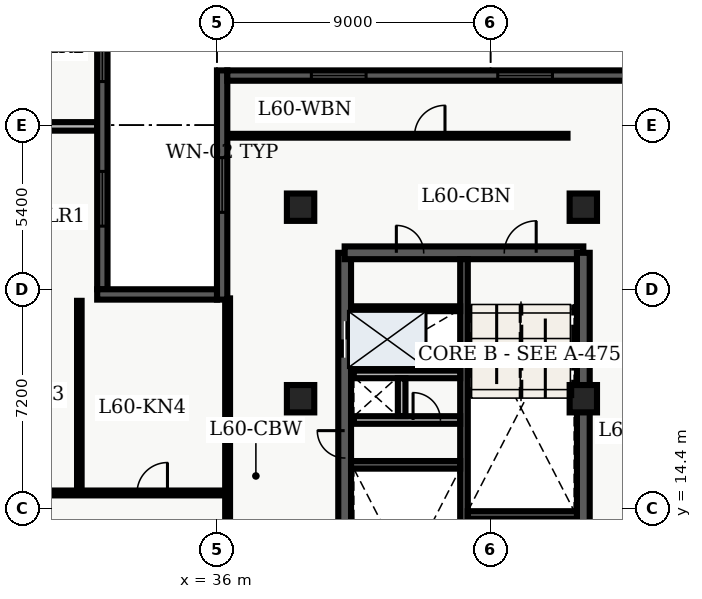
"""IFC4 building model, lengths in metres.
Left out: names, types, materials, properties, quantities, classifications, styles, units other than length and angle.
Written with IfcOpenShell. Run it as: python <this file> out.ifc"""

import sys

from ifc_helpers import new_model, entity, si_unit, converted_unit, direction, frame, origin_with_axes, origin_2d_with_axis, place, context, subcontext, project, spatial, polyline, rectangle, outline, extrude, element, fill, save


model = new_model("IFC4")
c1 = context("Model", 3, precision=1e-05, world=origin_with_axes(), true_north=direction((0.0, 1.0)))
c2 = subcontext(c1, "Body", "Model", "MODEL_VIEW")
j1 = project(units=[si_unit("LENGTHUNIT", "METRE"), converted_unit("PLANEANGLEUNIT", "DEGREE", entity("IfcPlaneAngleMeasure", 0.017), si_unit("PLANEANGLEUNIT", "RADIAN"), dimensions=[0, 0, 0, 0, 0, 0, 0])], contexts=[c1])
p1 = place(None, origin_with_axes())
s1 = spatial("IfcSite", under=j1, at=p1, CompositionType="ELEMENT")
p2 = place(p1, origin_with_axes())
s2 = spatial("IfcBuilding", under=s1, at=p2, CompositionType="ELEMENT")
p3 = place(p2, frame((0.0, 0.0, 244.2), z_axis=(0.0, 0.0, 1.0), x_axis=(1.0, 0.0, 0.0)))
s3 = spatial("IfcBuildingStorey", under=s2, at=p3, CompositionType="ELEMENT", Elevation=244.2)
p4 = place(p3, frame((40.2, 7.2, 0.0), z_axis=(0.0, 0.0, 1.0), x_axis=(0.0, 1.0, 0.0)))
e1 = element("IfcWall", 1, at=p4, inside=s3, PredefinedType="SHEAR", context=c2, shape_type="SweptSolid", body=[
    extrude(outline(polyline([(0.0, -0.21), (15.6, -0.21), (15.6, 0.21), (0.0, 0.21), (0.0, -0.21)])), origin_with_axes(), (0.0, 0.0, 1.0), 3.6),
])
p5 = place(p4, frame((12.75, 0.0, 0.0), z_axis=(0.0, 0.0, 1.0), x_axis=(1.0, 0.0, 0.0)))
e2 = element("IfcOpeningElement", 2, at=p5, cuts=e1, PredefinedType="OPENING", context=c2, shape_type="SweptSolid", body=[
    extrude(rectangle(XDim=1.2, YDim=0.44, at=origin_2d_with_axis()), origin_with_axes(), (0.0, 0.0, 1.0), 2.15),
])
p6 = place(p4, frame((9.3, 0.0, 0.0), z_axis=(0.0, 0.0, 1.0), x_axis=(1.0, 0.0, 0.0)))
e3 = element("IfcOpeningElement", 3, at=p6, cuts=e1, PredefinedType="OPENING", context=c2, shape_type="SweptSolid", body=[
    extrude(rectangle(XDim=0.9, YDim=0.44, at=origin_2d_with_axis()), origin_with_axes(), (0.0, 0.0, 1.0), 2.15),
])
p7 = place(p3, frame((40.2, 22.8, 0.0), z_axis=(0.0, 0.0, 1.0), x_axis=(1.0, 0.0, 0.0)))
e4 = element("IfcWall", 4, at=p7, inside=s3, PredefinedType="SHEAR", context=c2, shape_type="SweptSolid", body=[
    extrude(outline(polyline([(0.0, -0.21), (7.85, -0.21), (7.85, 0.21), (0.0, 0.21), (0.0, -0.21)])), origin_with_axes(), (0.0, 0.0, 1.0), 3.6),
])
p8 = place(p7, frame((5.775, 0.0, 0.0), z_axis=(0.0, 0.0, 1.0), x_axis=(1.0, 0.0, 0.0)))
e5 = element("IfcOpeningElement", 5, at=p8, cuts=e4, PredefinedType="OPENING", context=c2, shape_type="SweptSolid", body=[
    extrude(rectangle(XDim=1.05, YDim=0.44, at=origin_2d_with_axis()), origin_with_axes(), (0.0, 0.0, 1.0), 2.15),
])
p9 = place(p7, frame((2.15, 0.0, 0.0), z_axis=(0.0, 0.0, 1.0), x_axis=(1.0, 0.0, 0.0)))
e6 = element("IfcOpeningElement", 6, at=p9, cuts=e4, PredefinedType="OPENING", context=c2, shape_type="SweptSolid", body=[
    extrude(rectangle(XDim=0.9, YDim=0.44, at=origin_2d_with_axis()), origin_with_axes(), (0.0, 0.0, 1.0), 2.15),
])
p10 = place(p3, frame((48.05, 7.2, 0.0), z_axis=(0.0, 0.0, 1.0), x_axis=(0.0, 1.0, 0.0)))
e7 = element("IfcWall", 7, at=p10, inside=s3, PredefinedType="SHEAR", context=c2, shape_type="SweptSolid", body=[
    extrude(outline(polyline([(0.0, -0.21), (15.6, -0.21), (15.6, 0.21), (0.0, 0.21), (0.0, -0.21)])), origin_with_axes(), (0.0, 0.0, 1.0), 3.6),
])
p11 = place(p10, frame((1.375, 0.0, 0.0), z_axis=(0.0, 0.0, 1.0), x_axis=(1.0, 0.0, 0.0)))
e8 = element("IfcOpeningElement", 8, at=p11, cuts=e7, PredefinedType="OPENING", context=c2, shape_type="SweptSolid", body=[
    extrude(rectangle(XDim=1.05, YDim=0.44, at=origin_2d_with_axis()), origin_with_axes(), (0.0, 0.0, 1.0), 2.15),
])
p12 = place(p10, frame((5.125, 0.0, 0.0), z_axis=(0.0, 0.0, 1.0), x_axis=(1.0, 0.0, 0.0)))
e9 = element("IfcOpeningElement", 9, at=p12, cuts=e7, PredefinedType="OPENING", context=c2, shape_type="SweptSolid", body=[
    extrude(rectangle(XDim=0.95, YDim=0.44, at=origin_2d_with_axis()), origin_with_axes(), (0.0, 0.0, 1.0), 2.15),
])
p13 = place(p3, frame((44.125, 7.41, 0.0), z_axis=(0.0, 0.0, 1.0), x_axis=(0.0, 1.0, 0.0)))
e10 = element("IfcWall", 10, at=p13, inside=s3, PredefinedType="SHEAR", context=c2, shape_type="SweptSolid", body=[
    extrude(outline(polyline([(0.0, -0.125), (15.18, -0.125), (15.18, 0.125), (0.0, 0.125), (0.0, -0.125)])), origin_with_axes(), (0.0, 0.0, 1.0), 3.6),
])
for number, where, z_axis, x_axis in (
    (11, (40.41, 15.825, 0.0), (0.0, 0.0, 1.0), (1.0, 0.0, 0.0)),
    (12, (44.25, 14.175, 0.0), (0.0, 0.0, 1.0), (1.0, 0.0, 0.0)),
):
    element("IfcWall", number, at=place(p3, frame(where, z_axis=z_axis, x_axis=x_axis)), inside=s3, PredefinedType="SHEAR", context=c2, shape_type="SweptSolid", body=[
        extrude(outline(polyline([(0.0, -0.125), (3.59, -0.125), (3.59, 0.125), (0.0, 0.125), (0.0, -0.125)])), origin_with_axes(), (0.0, 0.0, 1.0), 3.6),
    ])
p14 = place(p3, frame((40.5, 17.3, 0.0), z_axis=(0.0, 0.0, 1.0), x_axis=(1.0, 0.0, 0.0)))
e13 = element("IfcWall", 13, at=p14, inside=s3, PredefinedType="SOLIDWALL", context=c2, shape_type="SweptSolid", body=[
    extrude(outline(polyline([(0.0, -0.125), (3.5, -0.125), (3.5, 0.125), (0.0, 0.125), (0.0, -0.125)])), origin_with_axes(), (0.0, 0.0, 1.0), 2.64),
])
p15 = place(p14, frame((2.4, 0.0, 0.0), z_axis=(0.0, 0.0, 1.0), x_axis=(1.0, 0.0, 0.0)))
e14 = element("IfcOpeningElement", 14, at=p15, cuts=e13, PredefinedType="OPENING", context=c2, shape_type="SweptSolid", body=[
    extrude(rectangle(XDim=0.9, YDim=0.27, at=origin_2d_with_axis()), origin_with_axes(), (0.0, 0.0, 1.0), 2.15),
])
p16 = place(p3, frame((40.5, 18.8, 0.0), z_axis=(0.0, 0.0, 1.0), x_axis=(1.0, 0.0, 0.0)))
e15 = element("IfcWall", 15, at=p16, inside=s3, PredefinedType="SOLIDWALL", context=c2, shape_type="SweptSolid", body=[
    extrude(outline(polyline([(0.0, -0.125), (3.5, -0.125), (3.5, 0.125), (0.0, 0.125), (0.0, -0.125)])), origin_with_axes(), (0.0, 0.0, 1.0), 2.64),
])
p17 = place(p3, frame((42.075, 17.43, 0.0), z_axis=(0.0, 0.0, 1.0), x_axis=(0.0, 1.0, 0.0)))
e16 = element("IfcWall", 16, at=p17, inside=s3, PredefinedType="SOLIDWALL", context=c2, shape_type="SweptSolid", body=[
    extrude(outline(polyline([(0.0, -0.125), (1.24, -0.125), (1.24, 0.125), (0.0, 0.125), (0.0, -0.125)])), origin_with_axes(), (0.0, 0.0, 1.0), 2.64),
])
for number, where, z_axis, x_axis in (
    (17, (38.75, 18.0, 0.0), (0.0, 0.0, 1.0), (1.0, 0.0, 0.0)),
    (18, (38.75, 24.3, 0.0), (0.0, 0.0, 1.0), (1.0, 0.0, 0.0)),
    (19, (48.05, 18.0, 0.0), (0.0, 0.0, 1.0), (1.0, 0.0, 0.0)),
    (20, (48.05, 24.3, 0.0), (0.0, 0.0, 1.0), (1.0, 0.0, 0.0)),
):
    element("IfcColumn", number, at=place(p3, frame(where, z_axis=z_axis, x_axis=x_axis)), inside=s3, PredefinedType="COLUMN", context=c2, shape_type="SweptSolid", body=[
        extrude(rectangle(XDim=0.9, YDim=0.9, at=origin_2d_with_axis()), origin_with_axes(), (0.0, 0.0, 1.0), 3.9),
    ])
p18 = place(p3, frame((40.5, 20.96, 0.0), z_axis=(0.0, 0.0, 1.0), x_axis=(1.0, 0.0, 0.0)))
e21 = element("IfcWall", 21, at=p18, inside=s3, PredefinedType="PARTITIONING", context=c2, shape_type="SweptSolid", body=[
    extrude(outline(polyline([(0.0, -0.08), (3.5, -0.08), (3.5, 0.08), (0.0, 0.08), (0.0, -0.08)])), origin_with_axes(), (0.0, 0.0, 1.0), 2.64),
])
p19 = place(p3, frame((20.45, 26.958, 0.0), z_axis=(0.0, 0.0, 1.0), x_axis=(1.0, 0.0, 0.0)))
e22 = element("IfcWall", 22, at=p19, inside=s3, PredefinedType="PARTITIONING", context=c2, shape_type="SweptSolid", body=[
    extrude(outline(polyline([(0.0, -0.14), (11.615, -0.14), (11.615, 0.14), (0.0, 0.14), (0.0, -0.14)])), origin_with_axes(), (0.0, 0.0, 1.0), 2.64),
])
p20 = place(p3, frame((20.3, 14.9, 0.0), z_axis=(0.0, 0.0, 1.0), x_axis=(1.0, 0.0, 0.0)))
e23 = element("IfcWall", 23, at=p20, inside=s3, PredefinedType="PARTITIONING", context=c2, shape_type="SweptSolid", body=[
    extrude(outline(polyline([(0.0, -0.08), (16.05, -0.08), (16.05, 0.08), (0.0, 0.08), (0.0, -0.08)])), origin_with_axes(), (0.0, 0.0, 1.0), 2.64),
])
p21 = place(p20, frame((1.827, 0.0, 0.0), z_axis=(0.0, 0.0, 1.0), x_axis=(1.0, 0.0, 0.0)))
e24 = element("IfcOpeningElement", 24, at=p21, cuts=e23, PredefinedType="OPENING", context=c2, shape_type="SweptSolid", body=[
    extrude(rectangle(XDim=1.0, YDim=0.18, at=origin_2d_with_axis()), origin_with_axes(), (0.0, 0.0, 1.0), 2.15),
])
p22 = place(p20, frame((5.386, 0.0, 0.0), z_axis=(0.0, 0.0, 1.0), x_axis=(1.0, 0.0, 0.0)))
e25 = element("IfcOpeningElement", 25, at=p22, cuts=e23, PredefinedType="OPENING", context=c2, shape_type="SweptSolid", body=[
    extrude(rectangle(XDim=1.0, YDim=0.18, at=origin_2d_with_axis()), origin_with_axes(), (0.0, 0.0, 1.0), 2.15),
])
p23 = place(p20, frame((9.236, 0.0, 0.0), z_axis=(0.0, 0.0, 1.0), x_axis=(1.0, 0.0, 0.0)))
e26 = element("IfcOpeningElement", 26, at=p23, cuts=e23, PredefinedType="OPENING", context=c2, shape_type="SweptSolid", body=[
    extrude(rectangle(XDim=1.0, YDim=0.18, at=origin_2d_with_axis()), origin_with_axes(), (0.0, 0.0, 1.0), 2.15),
])
p24 = place(p20, frame((13.572, 0.0, 0.0), z_axis=(0.0, 0.0, 1.0), x_axis=(1.0, 0.0, 0.0)))
e27 = element("IfcOpeningElement", 27, at=p24, cuts=e23, PredefinedType="OPENING", context=c2, shape_type="SweptSolid", body=[
    extrude(rectangle(XDim=1.0, YDim=0.18, at=origin_2d_with_axis()), origin_with_axes(), (0.0, 0.0, 1.0), 2.15),
])
p25 = place(p3, frame((36.35, 4.35, 0.0), z_axis=(0.0, 0.0, 1.0), x_axis=(0.0, 1.0, 0.0)))
e28 = element("IfcWall", 28, at=p25, inside=s3, PredefinedType="PARTITIONING", context=c2, shape_type="SweptSolid", body=[
    extrude(outline(polyline([(0.0, -0.08), (16.95, -0.08), (16.95, 0.08), (0.0, 0.08), (0.0, -0.08)])), origin_with_axes(), (0.0, 0.0, 1.0), 2.64),
])
p26 = place(p3, frame((31.473, 15.02, 0.0), z_axis=(0.0, 0.0, 1.0), x_axis=(0.0, 1.0, 0.0)))
e29 = element("IfcWall", 29, at=p26, inside=s3, PredefinedType="PARTITIONING", context=c2, shape_type="SweptSolid", body=[
    extrude(outline(polyline([(0.0, -0.075), (6.2, -0.075), (6.2, 0.075), (0.0, 0.075), (0.0, -0.075)])), origin_with_axes(), (0.0, 0.0, 1.0), 2.64),
])
p27 = place(p3, frame((36.335, 26.65, 0.0), z_axis=(0.0, 0.0, 1.0), x_axis=(1.0, 0.0, 0.0)))
e30 = element("IfcWall", 30, at=p27, inside=s3, PredefinedType="PARTITIONING", context=c2, shape_type="SweptSolid", body=[
    extrude(outline(polyline([(0.0, -0.062), (11.195, -0.062), (11.195, 0.062), (0.0, 0.062), (0.0, -0.062)])), origin_with_axes(), (0.0, 0.0, 1.0), 2.64),
])
p28 = place(p27, frame((6.665, 0.0, 0.0), z_axis=(0.0, 0.0, 1.0), x_axis=(1.0, 0.0, 0.0)))
e31 = element("IfcOpeningElement", 31, at=p28, cuts=e30, PredefinedType="OPENING", context=c2, shape_type="SweptSolid", body=[
    extrude(rectangle(XDim=1.0, YDim=0.145, at=origin_2d_with_axis()), origin_with_axes(), (0.0, 0.0, 1.0), 2.15),
])
p29 = place(p3, frame((36.17, 21.26, 0.0), z_axis=(0.0, 0.0, 1.0), x_axis=(0.0, 1.0, 0.0)))
e32 = element("IfcWall", 32, at=p29, inside=s3, PredefinedType="SOLIDWALL", context=c2, shape_type="SweptSolid", body=[
    extrude(outline(polyline([(0.0, -0.17), (7.54, -0.17), (7.54, 0.17), (0.0, 0.17), (0.0, -0.17)])), origin_with_axes(), (0.0, 0.0, 1.0), 3.6),
])
p30 = place(p29, frame((3.77, 0.0, 0.45), z_axis=(0.0, 0.0, 1.0), x_axis=(1.0, 0.0, 0.0)))
e33 = element("IfcOpeningElement", 33, at=p30, cuts=e32, PredefinedType="OPENING", context=c2, shape_type="SweptSolid", body=[
    extrude(rectangle(XDim=1.8, YDim=0.36, at=origin_2d_with_axis()), origin_with_axes(), (0.0, 0.0, 1.0), 2.1),
])
p31 = place(p3, frame((36.34, 28.63, 0.0), z_axis=(0.0, 0.0, 1.0), x_axis=(1.0, 0.0, 0.0)))
e34 = element("IfcWall", 34, at=p31, inside=s3, PredefinedType="SOLIDWALL", context=c2, shape_type="SweptSolid", body=[
    extrude(outline(polyline([(0.0, -0.17), (13.46, -0.17), (13.46, 0.17), (0.0, 0.17), (0.0, -0.17)])), origin_with_axes(), (0.0, 0.0, 1.0), 3.6),
])
p32 = place(p31, frame((3.665, 0.0, 0.45), z_axis=(0.0, 0.0, 1.0), x_axis=(1.0, 0.0, 0.0)))
e35 = element("IfcOpeningElement", 35, at=p32, cuts=e34, PredefinedType="OPENING", context=c2, shape_type="SweptSolid", body=[
    extrude(rectangle(XDim=1.8, YDim=0.36, at=origin_2d_with_axis()), origin_with_axes(), (0.0, 0.0, 1.0), 2.1),
])
p33 = place(p31, frame((9.795, 0.0, 0.45), z_axis=(0.0, 0.0, 1.0), x_axis=(1.0, 0.0, 0.0)))
e36 = element("IfcOpeningElement", 36, at=p33, cuts=e34, PredefinedType="OPENING", context=c2, shape_type="SweptSolid", body=[
    extrude(rectangle(XDim=1.8, YDim=0.36, at=origin_2d_with_axis()), origin_with_axes(), (0.0, 0.0, 1.0), 2.1),
])
p34 = place(p3, frame((32.23, 41.82, 0.0), z_axis=(0.0, 0.0, 1.0), x_axis=(0.0, -1.0, 0.0)))
e37 = element("IfcWall", 37, at=p34, inside=s3, PredefinedType="SOLIDWALL", context=c2, shape_type="SweptSolid", body=[
    extrude(outline(polyline([(0.0, -0.17), (20.22, -0.17), (20.22, 0.17), (0.0, 0.17), (0.0, -0.17)])), origin_with_axes(), (0.0, 0.0, 1.0), 3.6),
])
p35 = place(p34, frame((2.978, 0.0, 0.45), z_axis=(0.0, 0.0, 1.0), x_axis=(1.0, 0.0, 0.0)))
e38 = element("IfcOpeningElement", 38, at=p35, cuts=e37, PredefinedType="OPENING", context=c2, shape_type="SweptSolid", body=[
    extrude(rectangle(XDim=1.8, YDim=0.36, at=origin_2d_with_axis()), origin_with_axes(), (0.0, 0.0, 1.0), 2.1),
])
p36 = place(p34, frame((7.282, 0.0, 0.45), z_axis=(0.0, 0.0, 1.0), x_axis=(1.0, 0.0, 0.0)))
e39 = element("IfcOpeningElement", 39, at=p36, cuts=e37, PredefinedType="OPENING", context=c2, shape_type="SweptSolid", body=[
    extrude(rectangle(XDim=1.8, YDim=0.36, at=origin_2d_with_axis()), origin_with_axes(), (0.0, 0.0, 1.0), 2.1),
])
p37 = place(p34, frame((12.487, 0.0, 0.45), z_axis=(0.0, 0.0, 1.0), x_axis=(1.0, 0.0, 0.0)))
e40 = element("IfcOpeningElement", 40, at=p37, cuts=e37, PredefinedType="OPENING", context=c2, shape_type="SweptSolid", body=[
    extrude(rectangle(XDim=1.8, YDim=0.36, at=origin_2d_with_axis()), origin_with_axes(), (0.0, 0.0, 1.0), 2.1),
])
p38 = place(p34, frame((17.243, 0.0, 0.45), z_axis=(0.0, 0.0, 1.0), x_axis=(1.0, 0.0, 0.0)))
e41 = element("IfcOpeningElement", 41, at=p38, cuts=e37, PredefinedType="OPENING", context=c2, shape_type="SweptSolid", body=[
    extrude(rectangle(XDim=1.8, YDim=0.36, at=origin_2d_with_axis()), origin_with_axes(), (0.0, 0.0, 1.0), 2.1),
])
p39 = place(p3, frame((32.06, 21.43, 0.0), z_axis=(0.0, 0.0, 1.0), x_axis=(1.0, 0.0, 0.0)))
e42 = element("IfcWall", 42, at=p39, inside=s3, PredefinedType="SOLIDWALL", context=c2, shape_type="SweptSolid", body=[
    extrude(outline(polyline([(0.0, -0.17), (3.94, -0.17), (3.94, 0.17), (0.0, 0.17), (0.0, -0.17)])), origin_with_axes(), (0.0, 0.0, 1.0), 3.6),
])
p40 = place(p4, frame((12.75, 0.0, 0.0), z_axis=(0.0, 0.0, 1.0), x_axis=(1.0, 0.0, 0.0)))
e43 = element("IfcDoor", 43, at=p40, inside=s3, OperationType="DOUBLE_DOOR_SLIDING", PredefinedType="DOOR", context=c2, shape_type="SweptSolid", body=[
    extrude(rectangle(XDim=1.2, YDim=0.09, at=origin_2d_with_axis()), origin_with_axes(), (0.0, 0.0, 1.0), 2.15),
])
fill(e2, e43)
p41 = place(p4, frame((9.3, 0.0, 0.0), z_axis=(0.0, 0.0, 1.0), x_axis=(1.0, 0.0, 0.0)))
e44 = element("IfcDoor", 44, at=p41, inside=s3, OperationType="SINGLE_SWING_RIGHT", PredefinedType="DOOR", context=c2, shape_type="SweptSolid", body=[
    extrude(rectangle(XDim=0.9, YDim=0.09, at=origin_2d_with_axis()), origin_with_axes(), (0.0, 0.0, 1.0), 2.15),
])
fill(e3, e44)
p42 = place(p14, frame((2.4, 0.0, 0.0), z_axis=(0.0, 0.0, 1.0), x_axis=(1.0, 0.0, 0.0)))
e45 = element("IfcDoor", 45, at=p42, inside=s3, OperationType="SINGLE_SWING_LEFT", PredefinedType="DOOR", context=c2, shape_type="SweptSolid", body=[
    extrude(rectangle(XDim=0.9, YDim=0.09, at=origin_2d_with_axis()), origin_with_axes(), (0.0, 0.0, 1.0), 2.15),
])
fill(e14, e45)
p43 = place(p7, frame((5.775, 0.0, 0.0), z_axis=(0.0, 0.0, 1.0), x_axis=(1.0, 0.0, 0.0)))
e46 = element("IfcDoor", 46, at=p43, inside=s3, OperationType="SINGLE_SWING_RIGHT", PredefinedType="DOOR", context=c2, shape_type="SweptSolid", body=[
    extrude(rectangle(XDim=1.05, YDim=0.09, at=origin_2d_with_axis()), origin_with_axes(), (0.0, 0.0, 1.0), 2.15),
])
fill(e5, e46)
p44 = place(p7, frame((2.15, 0.0, 0.0), z_axis=(0.0, 0.0, 1.0), x_axis=(1.0, 0.0, 0.0)))
e47 = element("IfcDoor", 47, at=p44, inside=s3, OperationType="SINGLE_SWING_LEFT", PredefinedType="DOOR", context=c2, shape_type="SweptSolid", body=[
    extrude(rectangle(XDim=0.9, YDim=0.09, at=origin_2d_with_axis()), origin_with_axes(), (0.0, 0.0, 1.0), 2.15),
])
fill(e6, e47)
p45 = place(p20, frame((13.572, 0.0, 0.0), z_axis=(0.0, 0.0, 1.0), x_axis=(1.0, 0.0, 0.0)))
e48 = element("IfcDoor", 48, at=p45, inside=s3, OperationType="SINGLE_SWING_RIGHT", PredefinedType="DOOR", context=c2, shape_type="SweptSolid", body=[
    extrude(rectangle(XDim=1.0, YDim=0.09, at=origin_2d_with_axis()), origin_with_axes(), (0.0, 0.0, 1.0), 2.15),
])
fill(e27, e48)
p46 = place(p27, frame((6.665, 0.0, 0.0), z_axis=(0.0, 0.0, 1.0), x_axis=(1.0, 0.0, 0.0)))
e49 = element("IfcDoor", 49, at=p46, inside=s3, OperationType="SINGLE_SWING_RIGHT", PredefinedType="DOOR", context=c2, shape_type="SweptSolid", body=[
    extrude(rectangle(XDim=1.0, YDim=0.075, at=origin_2d_with_axis()), origin_with_axes(), (0.0, 0.0, 1.0), 2.15),
])
fill(e31, e49)
p47 = place(p29, frame((3.77, 0.0, 0.45), z_axis=(0.0, 0.0, 1.0), x_axis=(1.0, 0.0, 0.0)))
e50 = element("IfcWindow", 50, at=p47, inside=s3, PredefinedType="WINDOW", context=c2, shape_type="SweptSolid", body=[
    extrude(rectangle(XDim=1.8, YDim=0.09, at=origin_2d_with_axis()), origin_with_axes(), (0.0, 0.0, 1.0), 2.1),
])
fill(e33, e50)
p48 = place(p31, frame((3.665, 0.0, 0.45), z_axis=(0.0, 0.0, 1.0), x_axis=(1.0, 0.0, 0.0)))
e51 = element("IfcWindow", 51, at=p48, inside=s3, PredefinedType="WINDOW", context=c2, shape_type="SweptSolid", body=[
    extrude(rectangle(XDim=1.8, YDim=0.09, at=origin_2d_with_axis()), origin_with_axes(), (0.0, 0.0, 1.0), 2.1),
])
fill(e35, e51)
p49 = place(p31, frame((9.795, 0.0, 0.45), z_axis=(0.0, 0.0, 1.0), x_axis=(1.0, 0.0, 0.0)))
e52 = element("IfcWindow", 52, at=p49, inside=s3, PredefinedType="WINDOW", context=c2, shape_type="SweptSolid", body=[
    extrude(rectangle(XDim=1.8, YDim=0.09, at=origin_2d_with_axis()), origin_with_axes(), (0.0, 0.0, 1.0), 2.1),
])
fill(e36, e52)
p50 = place(p34, frame((12.487, 0.0, 0.45), z_axis=(0.0, 0.0, 1.0), x_axis=(1.0, 0.0, 0.0)))
e53 = element("IfcWindow", 53, at=p50, inside=s3, PredefinedType="WINDOW", context=c2, shape_type="SweptSolid", body=[
    extrude(rectangle(XDim=1.8, YDim=0.09, at=origin_2d_with_axis()), origin_with_axes(), (0.0, 0.0, 1.0), 2.1),
])
fill(e40, e53)
p51 = place(p34, frame((17.243, 0.0, 0.45), z_axis=(0.0, 0.0, 1.0), x_axis=(1.0, 0.0, 0.0)))
e54 = element("IfcWindow", 54, at=p51, inside=s3, PredefinedType="WINDOW", context=c2, shape_type="SweptSolid", body=[
    extrude(rectangle(XDim=1.8, YDim=0.09, at=origin_2d_with_axis()), origin_with_axes(), (0.0, 0.0, 1.0), 2.1),
])
fill(e41, e54)
save(model, sys.argv[1])
